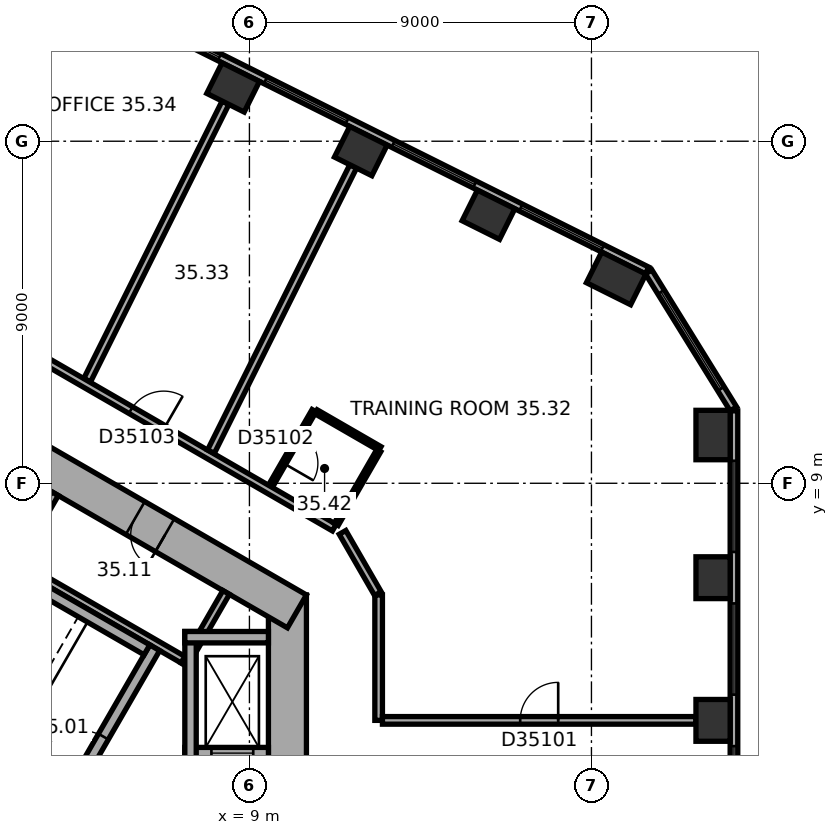
"""IFC4 building model, lengths in metres.
Left out: names, types, materials, properties, quantities, classifications, styles, units other than length and angle.
Written with IfcOpenShell. Run it as: python <this file> out.ifc"""

import sys

from ifc_helpers import new_model, si_unit, direction, frame, frame_2d, origin, origin_2d, place, context, subcontext, project, spatial, rectangle, extrude, element, fill, save


model = new_model("IFC4")
c1 = context("Model", 3, precision=1e-05, world=origin(), true_north=direction((0.0, 1.0)))
c2 = subcontext(c1, "Body", "Model", "MODEL_VIEW")
j1 = project(units=[si_unit("LENGTHUNIT", "METRE"), si_unit("PLANEANGLEUNIT", "RADIAN")], contexts=[c1])
p1 = place(None, origin())
s1 = spatial("IfcSite", under=j1, at=p1, CompositionType="ELEMENT")
p2 = place(p1, origin())
s2 = spatial("IfcBuilding", under=s1, at=p2, CompositionType="ELEMENT")
p3 = place(p2, frame((0.0, 0.0, 146.6)))
s3 = spatial("IfcBuildingStorey", under=s2, at=p3, CompositionType="ELEMENT", Elevation=146.6)
for number, where, z_axis, x_axis in (
    (1, (21.2, 2.761, 0.0), (0.0, 0.0, 1.0), (0.0, 1.0, 0.0)),
    (2, (21.2, 6.515, 0.0), (0.0, 0.0, 1.0), (0.0, 1.0, 0.0)),
):
    element("IfcColumn", number, at=place(p3, frame(where, z_axis=z_axis, x_axis=x_axis)), inside=s3, PredefinedType="COLUMN", context=c2, shape_type="SweptSolid", body=[
        extrude(rectangle(XDim=1.1, YDim=0.9, at=origin_2d()), origin(), (0.0, 0.0, 1.0), 3.7),
    ])
for number, where, z_axis, x_axis in (
    (3, (21.2, 10.27, 0.0), (0.0, 0.0, 1.0), (0.0, 1.0, 0.0)),
    (4, (18.65, 14.39, 0.0), (0.0, 0.0, 1.0), (-0.895, 0.446, 0.0)),
):
    element("IfcColumn", number, at=place(p3, frame(where, z_axis=z_axis, x_axis=x_axis)), inside=s3, PredefinedType="COLUMN", context=c2, shape_type="SweptSolid", body=[
        extrude(rectangle(XDim=1.3, YDim=0.9, at=origin_2d()), origin(), (0.0, 0.0, 1.0), 3.7),
    ])
for number, where, z_axis, x_axis in (
    (5, (15.29, 16.065, 0.0), (0.0, 0.0, 1.0), (-0.895, 0.446, 0.0)),
    (6, (11.931, 17.74, 0.0), (0.0, 0.0, 1.0), (-0.895, 0.446, 0.0)),
    (7, (8.571, 19.416, 0.0), (0.0, 0.0, 1.0), (-0.895, 0.446, 0.0)),
):
    element("IfcColumn", number, at=place(p3, frame(where, z_axis=z_axis, x_axis=x_axis)), inside=s3, PredefinedType="COLUMN", context=c2, shape_type="SweptSolid", body=[
        extrude(rectangle(XDim=1.1, YDim=0.9, at=origin_2d()), origin(), (0.0, 0.0, 1.0), 3.7),
    ])
p4 = place(p3, frame((10.0, -6.062, 0.0), z_axis=(0.0, 0.0, 1.0), x_axis=(0.0, 1.0, 0.0)))
e8 = element("IfcWall", 8, at=p4, inside=s3, PredefinedType="SHEAR", context=c2, shape_type="SweptSolid", body=[
    extrude(rectangle(XDim=12.125, YDim=1.0, at=frame_2d((6.062, 0.0))), origin(), (0.0, 0.0, 1.0), 3.7),
])
p5 = place(p4, frame((6.262, 0.0, 0.0)))
e9 = element("IfcOpeningElement", 9, at=p5, cuts=e8, PredefinedType="OPENING", context=c2, shape_type="SweptSolid", body=[
    extrude(rectangle(XDim=1.5, YDim=2.1, at=frame_2d((0.75, 1.05))), frame((0.0, 0.51, 0.0), z_axis=(0.0, -1.0, 0.0), x_axis=(1.0, 0.0, 0.0)), (0.0, 0.0, 1.0), 1.02),
])
p6 = place(p4, frame((3.112, 0.0, 0.0)))
e10 = element("IfcOpeningElement", 10, at=p6, cuts=e8, PredefinedType="OPENING", context=c2, shape_type="SweptSolid", body=[
    extrude(rectangle(XDim=0.9, YDim=2.1, at=frame_2d((0.45, 1.05))), frame((0.0, 0.51, 0.0), z_axis=(0.0, -1.0, 0.0), x_axis=(1.0, 0.0, 0.0)), (0.0, 0.0, 1.0), 1.02),
])
p7 = place(p3, frame((10.25, 5.629, 0.0), z_axis=(0.0, 0.0, 1.0), x_axis=(-0.866022616891, 0.50000482701, 0.0)))
e11 = element("IfcWall", 11, at=p7, inside=s3, PredefinedType="SHEAR", context=c2, shape_type="SweptSolid", body=[
    extrude(rectangle(XDim=12.125, YDim=1.0, at=frame_2d((6.062, 0.0))), origin(), (0.0, 0.0, 1.0), 3.7),
])
p8 = place(p7, frame((4.012, 0.0, 0.0)))
e12 = element("IfcOpeningElement", 12, at=p8, cuts=e11, PredefinedType="OPENING", context=c2, shape_type="SweptSolid", body=[
    extrude(rectangle(XDim=0.9, YDim=2.1, at=frame_2d((0.45, 1.05))), frame((0.0, 0.51, 0.0), z_axis=(0.0, -1.0, 0.0), x_axis=(1.0, 0.0, 0.0)), (0.0, 0.0, 1.0), 1.02),
])
p9 = place(p7, frame((7.912, 0.0, 0.0)))
e13 = element("IfcOpeningElement", 13, at=p9, cuts=e11, PredefinedType="OPENING", context=c2, shape_type="SweptSolid", body=[
    extrude(rectangle(XDim=0.9, YDim=2.1, at=frame_2d((0.45, 1.05))), frame((0.0, 0.51, 0.0), z_axis=(0.0, -1.0, 0.0), x_axis=(1.0, 0.0, 0.0)), (0.0, 0.0, 1.0), 1.02),
])
p10 = place(p3, frame((21.75, -9.138, 0.0), z_axis=(0.0, 0.0, 1.0), x_axis=(0.0, 1.0, 0.0)))
e14 = element("IfcWall", 14, at=p10, inside=s3, PredefinedType="STANDARD", context=c2, shape_type="SweptSolid", body=[
    extrude(rectangle(XDim=20.044, YDim=0.2, at=frame_2d((10.022, 0.0))), origin(), (0.0, 0.0, 1.0), 3.7),
])
p11 = place(p10, frame((1.314, 0.0, 0.9)))
e15 = element("IfcOpeningElement", 15, at=p11, cuts=e14, PredefinedType="OPENING", context=c2, shape_type="SweptSolid", body=[
    extrude(rectangle(XDim=2.4, YDim=2.0, at=frame_2d((1.2, 1.0))), frame((0.0, 0.11, 0.0), z_axis=(0.0, -1.0, 0.0), x_axis=(1.0, 0.0, 0.0)), (0.0, 0.0, 1.0), 0.22),
])
p12 = place(p10, frame((5.069, 0.0, 0.9)))
e16 = element("IfcOpeningElement", 16, at=p12, cuts=e14, PredefinedType="OPENING", context=c2, shape_type="SweptSolid", body=[
    extrude(rectangle(XDim=2.4, YDim=2.0, at=frame_2d((1.2, 1.0))), frame((0.0, 0.11, 0.0), z_axis=(0.0, -1.0, 0.0), x_axis=(1.0, 0.0, 0.0)), (0.0, 0.0, 1.0), 0.22),
])
p13 = place(p10, frame((8.823, 0.0, 0.9)))
e17 = element("IfcOpeningElement", 17, at=p13, cuts=e14, PredefinedType="OPENING", context=c2, shape_type="SweptSolid", body=[
    extrude(rectangle(XDim=2.4, YDim=2.0, at=frame_2d((1.2, 1.0))), frame((0.0, 0.11, 0.0), z_axis=(0.0, -1.0, 0.0), x_axis=(1.0, 0.0, 0.0)), (0.0, 0.0, 1.0), 0.22),
])
p14 = place(p10, frame((12.577, 0.0, 0.9)))
e18 = element("IfcOpeningElement", 18, at=p14, cuts=e14, PredefinedType="OPENING", context=c2, shape_type="SweptSolid", body=[
    extrude(rectangle(XDim=2.4, YDim=2.0, at=frame_2d((1.2, 1.0))), frame((0.0, 0.11, 0.0), z_axis=(0.0, -1.0, 0.0), x_axis=(1.0, 0.0, 0.0)), (0.0, 0.0, 1.0), 0.22),
])
p15 = place(p10, frame((16.331, 0.0, 0.9)))
e19 = element("IfcOpeningElement", 19, at=p15, cuts=e14, PredefinedType="OPENING", context=c2, shape_type="SweptSolid", body=[
    extrude(rectangle(XDim=2.4, YDim=2.0, at=frame_2d((1.2, 1.0))), frame((0.0, 0.11, 0.0), z_axis=(0.0, -1.0, 0.0), x_axis=(1.0, 0.0, 0.0)), (0.0, 0.0, 1.0), 0.22),
])
p16 = place(p3, frame((21.735, 10.958, 0.0), z_axis=(0.0, 0.0, 1.0), x_axis=(-0.526213807775, 0.850352296702, 0.0)))
e20 = element("IfcWall", 20, at=p16, inside=s3, PredefinedType="STANDARD", context=c2, shape_type="SweptSolid", body=[
    extrude(rectangle(XDim=4.238, YDim=0.2, at=frame_2d((2.119, 0.0))), origin(), (0.0, 0.0, 1.0), 3.7),
])
p17 = place(p16, frame((0.619, 0.0, 0.9)))
e21 = element("IfcOpeningElement", 21, at=p17, cuts=e20, PredefinedType="OPENING", context=c2, shape_type="SweptSolid", body=[
    extrude(rectangle(XDim=3.0, YDim=2.0, at=frame_2d((1.5, 1.0))), frame((0.0, 0.11, 0.0), z_axis=(0.0, -1.0, 0.0), x_axis=(1.0, 0.0, 0.0)), (0.0, 0.0, 1.0), 0.22),
])
p18 = place(p3, frame((19.464, 14.599, 0.0), z_axis=(0.0, 0.0, 1.0), x_axis=(-0.894935755043, 0.446195018289, 0.0)))
e22 = element("IfcWall", 22, at=p18, inside=s3, PredefinedType="STANDARD", context=c2, shape_type="SweptSolid", body=[
    extrude(rectangle(XDim=20.044, YDim=0.2, at=frame_2d((10.022, 0.0))), origin(), (0.0, 0.0, 1.0), 3.7),
])
p19 = place(p18, frame((1.313, 0.0, 0.9)))
e23 = element("IfcOpeningElement", 23, at=p19, cuts=e22, PredefinedType="OPENING", context=c2, shape_type="SweptSolid", body=[
    extrude(rectangle(XDim=2.4, YDim=2.0, at=frame_2d((1.2, 1.0))), frame((0.0, 0.11, 0.0), z_axis=(0.0, -1.0, 0.0), x_axis=(1.0, 0.0, 0.0)), (0.0, 0.0, 1.0), 0.22),
])
p20 = place(p18, frame((5.067, 0.0, 0.9)))
e24 = element("IfcOpeningElement", 24, at=p20, cuts=e22, PredefinedType="OPENING", context=c2, shape_type="SweptSolid", body=[
    extrude(rectangle(XDim=2.4, YDim=2.0, at=frame_2d((1.2, 1.0))), frame((0.0, 0.11, 0.0), z_axis=(0.0, -1.0, 0.0), x_axis=(1.0, 0.0, 0.0)), (0.0, 0.0, 1.0), 0.22),
])
p21 = place(p18, frame((8.821, 0.0, 0.9)))
e25 = element("IfcOpeningElement", 25, at=p21, cuts=e22, PredefinedType="OPENING", context=c2, shape_type="SweptSolid", body=[
    extrude(rectangle(XDim=2.4, YDim=2.0, at=frame_2d((1.2, 1.0))), frame((0.0, 0.11, 0.0), z_axis=(0.0, -1.0, 0.0), x_axis=(1.0, 0.0, 0.0)), (0.0, 0.0, 1.0), 0.22),
])
p22 = place(p18, frame((12.575, 0.0, 0.9)))
e26 = element("IfcOpeningElement", 26, at=p22, cuts=e22, PredefinedType="OPENING", context=c2, shape_type="SweptSolid", body=[
    extrude(rectangle(XDim=2.4, YDim=2.0, at=frame_2d((1.2, 1.0))), frame((0.0, 0.11, 0.0), z_axis=(0.0, -1.0, 0.0), x_axis=(1.0, 0.0, 0.0)), (0.0, 0.0, 1.0), 0.22),
])
p23 = place(p18, frame((16.329, 0.0, 0.9)))
e27 = element("IfcOpeningElement", 27, at=p23, cuts=e22, PredefinedType="OPENING", context=c2, shape_type="SweptSolid", body=[
    extrude(rectangle(XDim=2.4, YDim=2.0, at=frame_2d((1.2, 1.0))), frame((0.0, 0.11, 0.0), z_axis=(0.0, -1.0, 0.0), x_axis=(1.0, 0.0, 0.0)), (0.0, 0.0, 1.0), 0.22),
])
p24 = place(p3, frame((7.424, 4.259, 0.0), z_axis=(0.0, 0.0, 1.0), x_axis=(-0.866026010844, 0.49999894854, 0.0)))
e28 = element("IfcWall", 28, at=p24, inside=s3, PredefinedType="PARTITIONING", context=c2, shape_type="SweptSolid", body=[
    extrude(rectangle(XDim=8.0, YDim=0.2, at=frame_2d((4.0, 0.0))), origin(), (0.0, 0.0, 1.0), 3.42),
])
for number, where, z_axis, x_axis in (
    (29, (7.287, 4.222, 0.0), (0.0, 0.0, 1.0), (0.5, 0.866, 0.0)),
    (30, (2.784, 6.822, 0.0), (0.0, 0.0, 1.0), (0.5, 0.866, 0.0)),
):
    element("IfcWall", number, at=place(p3, frame(where, z_axis=z_axis, x_axis=x_axis)), inside=s3, PredefinedType="PARTITIONING", context=c2, shape_type="SweptSolid", body=[
        extrude(rectangle(XDim=2.2, YDim=0.2, at=frame_2d((1.1, 0.0))), origin(), (0.0, 0.0, 1.0), 3.42),
    ])
p25 = place(p3, frame((4.158, 0.602, 0.0), z_axis=(0.0, 0.0, 1.0), x_axis=(0.499977259774, 0.866038532462, 0.0)))
e31 = element("IfcWall", 31, at=p25, inside=s3, PredefinedType="SHEAR", context=c2, shape_type="SweptSolid", body=[
    extrude(rectangle(XDim=4.7, YDim=0.3, at=frame_2d((2.35, 0.0))), origin(), (0.0, 0.0, 1.0), 3.42),
])
p26 = place(p25, frame((0.8, 0.0, 0.0)))
e32 = element("IfcOpeningElement", 32, at=p26, cuts=e31, PredefinedType="OPENING", context=c2, shape_type="SweptSolid", body=[
    extrude(rectangle(XDim=1.2, YDim=2.1, at=frame_2d((0.6, 1.05))), frame((0.0, 0.16, 0.0), z_axis=(0.0, -1.0, 0.0), x_axis=(1.0, 0.0, 0.0)), (0.0, 0.0, 1.0), 0.32),
])
for number, where, z_axis, x_axis in (
    (33, (4.103, 0.807, 0.0), (0.0, 0.0, 1.0), (-0.866, 0.5, 0.0)),
    (34, (6.303, 4.617, 0.0), (0.0, 0.0, 1.0), (-0.866, 0.5, 0.0)),
):
    element("IfcWall", number, at=place(p3, frame(where, z_axis=z_axis, x_axis=x_axis)), inside=s3, PredefinedType="SHEAR", context=c2, shape_type="SweptSolid", body=[
        extrude(rectangle(XDim=7.06, YDim=0.3, at=frame_2d((3.53, 0.0))), origin(), (0.0, 0.0, 1.0), 3.42),
    ])
p27 = place(p3, frame((7.3, 1.9, 0.0), z_axis=(0.0, 0.0, 1.0), x_axis=(1.0, 0.0, 0.0)))
e35 = element("IfcWall", 35, at=p27, inside=s3, PredefinedType="SHEAR", context=c2, shape_type="SweptSolid", body=[
    extrude(rectangle(XDim=2.2, YDim=0.3, at=frame_2d((1.1, 0.0))), origin(), (0.0, 0.0, 1.0), 3.42),
])
p28 = place(p27, frame((0.7, 0.0, 0.0)))
e36 = element("IfcOpeningElement", 36, at=p28, cuts=e35, PredefinedType="OPENING", context=c2, shape_type="SweptSolid", body=[
    extrude(rectangle(XDim=1.1, YDim=2.1, at=frame_2d((0.55, 1.05))), frame((0.0, 0.16, 0.0), z_axis=(0.0, -1.0, 0.0), x_axis=(1.0, 0.0, 0.0)), (0.0, 0.0, 1.0), 0.32),
])
p29 = place(p3, frame((7.45, 1.75, 0.0), z_axis=(0.0, 0.0, 1.0), x_axis=(0.0, 1.0, 0.0)))
e37 = element("IfcWall", 37, at=p29, inside=s3, PredefinedType="SHEAR", context=c2, shape_type="SweptSolid", body=[
    extrude(rectangle(XDim=3.35, YDim=0.3, at=frame_2d((1.675, 0.0))), origin(), (0.0, 0.0, 1.0), 3.42),
])
p30 = place(p3, frame((7.3, 4.95, 0.0), z_axis=(0.0, 0.0, 1.0), x_axis=(1.0, 0.0, 0.0)))
e38 = element("IfcWall", 38, at=p30, inside=s3, PredefinedType="SHEAR", context=c2, shape_type="SweptSolid", body=[
    extrude(rectangle(XDim=2.2, YDim=0.3, at=frame_2d((1.1, 0.0))), origin(), (0.0, 0.0, 1.0), 3.42),
])
p31 = place(p3, frame((8.37, 19.013, 0.0), z_axis=(0.0, 0.0, 1.0), x_axis=(-0.446183598632, -0.894941448538, 0.0)))
e39 = element("IfcWall", 39, at=p31, inside=s3, PredefinedType="PARTITIONING", context=c2, shape_type="SweptSolid", body=[
    extrude(rectangle(XDim=8.156, YDim=0.2, at=frame_2d((4.078, 0.0))), origin(), (0.0, 0.0, 1.0), 3.42),
])
p32 = place(p3, frame((9.552, 8.919, 0.0), z_axis=(0.0, 0.0, 1.0), x_axis=(0.499952165731, 0.866053019151, 0.0)))
e40 = element("IfcWall", 40, at=p32, inside=s3, PredefinedType="PARTITIONING", context=c2, shape_type="SweptSolid", body=[
    extrude(rectangle(XDim=2.3, YDim=0.12, at=frame_2d((1.15, 0.0))), origin(), (0.0, 0.0, 1.0), 3.42),
])
p33 = place(p32, frame((0.7, 0.0, 0.0)))
e41 = element("IfcOpeningElement", 41, at=p33, cuts=e40, PredefinedType="OPENING", context=c2, shape_type="SweptSolid", body=[
    extrude(rectangle(XDim=0.9, YDim=2.1, at=frame_2d((0.45, 1.05))), frame((0.0, 0.07, 0.0), z_axis=(0.0, -1.0, 0.0), x_axis=(1.0, 0.0, 0.0)), (0.0, 0.0, 1.0), 0.14),
])
p34 = place(p3, frame((10.753, 10.881, 0.0), z_axis=(0.0, 0.0, 1.0), x_axis=(0.866043088465, -0.499969367985, 0.0)))
e42 = element("IfcWall", 42, at=p34, inside=s3, PredefinedType="PARTITIONING", context=c2, shape_type="SweptSolid", body=[
    extrude(rectangle(XDim=1.94, YDim=0.12, at=frame_2d((0.97, 0.0))), origin(), (0.0, 0.0, 1.0), 3.42),
])
p35 = place(p3, frame((11.233, 7.833, 0.0), z_axis=(0.0, 0.0, 1.0), x_axis=(-0.866021713988, 0.50000639086, 0.0)))
e43 = element("IfcWall", 43, at=p35, inside=s3, PredefinedType="PARTITIONING", context=c2, shape_type="SweptSolid", body=[
    extrude(rectangle(XDim=11.834, YDim=0.2, at=frame_2d((5.917, 0.0))), origin(), (0.0, 0.0, 1.0), 3.42),
])
p36 = place(p35, frame((5.185, 0.0, 0.0)))
e44 = element("IfcOpeningElement", 44, at=p36, cuts=e43, PredefinedType="OPENING", context=c2, shape_type="SweptSolid", body=[
    extrude(rectangle(XDim=1.0, YDim=2.1, at=frame_2d((0.5, 1.05))), frame((0.0, 0.11, 0.0), z_axis=(0.0, -1.0, 0.0), x_axis=(1.0, 0.0, 0.0)), (0.0, 0.0, 1.0), 0.22),
])
p37 = place(p3, frame((11.73, 17.338, 0.0), z_axis=(0.0, 0.0, 1.0), x_axis=(-0.446165200553, -0.894950620881, 0.0)))
e45 = element("IfcWall", 45, at=p37, inside=s3, PredefinedType="PARTITIONING", context=c2, shape_type="SweptSolid", body=[
    extrude(rectangle(XDim=8.386, YDim=0.2, at=frame_2d((4.193, 0.0))), origin(), (0.0, 0.0, 1.0), 2.87),
])
p38 = place(p3, frame((12.38, 6.097, 0.0), z_axis=(0.0, 0.0, 1.0), x_axis=(-0.499964847546, 0.866045698112, 0.0)))
e46 = element("IfcWall", 46, at=p38, inside=s3, PredefinedType="PARTITIONING", context=c2, shape_type="SweptSolid", body=[
    extrude(rectangle(XDim=1.86, YDim=0.2, at=frame_2d((0.93, 0.0))), origin(), (0.0, 0.0, 1.0), 3.42),
])
p39 = place(p3, frame((12.4, 2.761, 0.0), z_axis=(0.0, 0.0, 1.0), x_axis=(0.0, 1.0, 0.0)))
e47 = element("IfcWall", 47, at=p39, inside=s3, PredefinedType="PARTITIONING", context=c2, shape_type="SweptSolid", body=[
    extrude(rectangle(XDim=3.301, YDim=0.2, at=frame_2d((1.65, 0.0))), origin(), (0.0, 0.0, 1.0), 3.42),
])
p40 = place(p3, frame((12.404, 9.859, 0.0), z_axis=(0.0, 0.0, 1.0), x_axis=(-0.500030632641, -0.866007717299, 0.0)))
e48 = element("IfcWall", 48, at=p40, inside=s3, PredefinedType="PARTITIONING", context=c2, shape_type="SweptSolid", body=[
    extrude(rectangle(XDim=2.24, YDim=0.12, at=frame_2d((1.12, 0.0))), origin(), (0.0, 0.0, 1.0), 3.42),
])
p41 = place(p3, frame((20.75, 2.761, 0.0), z_axis=(0.0, 0.0, 1.0), x_axis=(-1.0, 0.0, 0.0)))
e49 = element("IfcWall", 49, at=p41, inside=s3, PredefinedType="PARTITIONING", context=c2, shape_type="SweptSolid", body=[
    extrude(rectangle(XDim=8.25, YDim=0.2, at=frame_2d((4.125, 0.0))), origin(), (0.0, 0.0, 1.0), 3.42),
])
p42 = place(p41, frame((3.625, 0.0, 0.0)))
e50 = element("IfcOpeningElement", 50, at=p42, cuts=e49, PredefinedType="OPENING", context=c2, shape_type="SweptSolid", body=[
    extrude(rectangle(XDim=1.0, YDim=2.1, at=frame_2d((0.5, 1.05))), frame((0.0, 0.11, 0.0), z_axis=(0.0, -1.0, 0.0), x_axis=(1.0, 0.0, 0.0)), (0.0, 0.0, 1.0), 0.22),
])
p43 = place(p13, origin())
e51 = element("IfcWindow", 51, at=p43, inside=s3, PartitioningType="SINGLE_PANEL", PredefinedType="WINDOW", context=c2, shape_type="SweptSolid", body=[
    extrude(rectangle(XDim=2.4, YDim=2.0, at=frame_2d((1.2, 1.0))), frame((0.0, 0.03, 0.0), z_axis=(0.0, -1.0, 0.0), x_axis=(1.0, 0.0, 0.0)), (0.0, 0.0, 1.0), 0.06),
])
fill(e17, e51)
p44 = place(p14, origin())
e52 = element("IfcWindow", 52, at=p44, inside=s3, PartitioningType="SINGLE_PANEL", PredefinedType="WINDOW", context=c2, shape_type="SweptSolid", body=[
    extrude(rectangle(XDim=2.4, YDim=2.0, at=frame_2d((1.2, 1.0))), frame((0.0, 0.03, 0.0), z_axis=(0.0, -1.0, 0.0), x_axis=(1.0, 0.0, 0.0)), (0.0, 0.0, 1.0), 0.06),
])
fill(e18, e52)
p45 = place(p15, origin())
e53 = element("IfcWindow", 53, at=p45, inside=s3, PartitioningType="SINGLE_PANEL", PredefinedType="WINDOW", context=c2, shape_type="SweptSolid", body=[
    extrude(rectangle(XDim=2.4, YDim=2.0, at=frame_2d((1.2, 1.0))), frame((0.0, 0.03, 0.0), z_axis=(0.0, -1.0, 0.0), x_axis=(1.0, 0.0, 0.0)), (0.0, 0.0, 1.0), 0.06),
])
fill(e19, e53)
p46 = place(p17, origin())
e54 = element("IfcWindow", 54, at=p46, inside=s3, PartitioningType="SINGLE_PANEL", PredefinedType="WINDOW", context=c2, shape_type="SweptSolid", body=[
    extrude(rectangle(XDim=3.0, YDim=2.0, at=frame_2d((1.5, 1.0))), frame((0.0, 0.03, 0.0), z_axis=(0.0, -1.0, 0.0), x_axis=(1.0, 0.0, 0.0)), (0.0, 0.0, 1.0), 0.06),
])
fill(e21, e54)
p47 = place(p19, origin())
e55 = element("IfcWindow", 55, at=p47, inside=s3, PartitioningType="SINGLE_PANEL", PredefinedType="WINDOW", context=c2, shape_type="SweptSolid", body=[
    extrude(rectangle(XDim=2.4, YDim=2.0, at=frame_2d((1.2, 1.0))), frame((0.0, 0.03, 0.0), z_axis=(0.0, -1.0, 0.0), x_axis=(1.0, 0.0, 0.0)), (0.0, 0.0, 1.0), 0.06),
])
fill(e23, e55)
p48 = place(p20, origin())
e56 = element("IfcWindow", 56, at=p48, inside=s3, PartitioningType="SINGLE_PANEL", PredefinedType="WINDOW", context=c2, shape_type="SweptSolid", body=[
    extrude(rectangle(XDim=2.4, YDim=2.0, at=frame_2d((1.2, 1.0))), frame((0.0, 0.03, 0.0), z_axis=(0.0, -1.0, 0.0), x_axis=(1.0, 0.0, 0.0)), (0.0, 0.0, 1.0), 0.06),
])
fill(e24, e56)
p49 = place(p21, origin())
e57 = element("IfcWindow", 57, at=p49, inside=s3, PartitioningType="SINGLE_PANEL", PredefinedType="WINDOW", context=c2, shape_type="SweptSolid", body=[
    extrude(rectangle(XDim=2.4, YDim=2.0, at=frame_2d((1.2, 1.0))), frame((0.0, 0.03, 0.0), z_axis=(0.0, -1.0, 0.0), x_axis=(1.0, 0.0, 0.0)), (0.0, 0.0, 1.0), 0.06),
])
fill(e25, e57)
p50 = place(p22, origin())
e58 = element("IfcWindow", 58, at=p50, inside=s3, PartitioningType="SINGLE_PANEL", PredefinedType="WINDOW", context=c2, shape_type="SweptSolid", body=[
    extrude(rectangle(XDim=2.4, YDim=2.0, at=frame_2d((1.2, 1.0))), frame((0.0, 0.03, 0.0), z_axis=(0.0, -1.0, 0.0), x_axis=(1.0, 0.0, 0.0)), (0.0, 0.0, 1.0), 0.06),
])
fill(e26, e58)
p51 = place(p26, origin())
e59 = element("IfcDoor", 59, at=p51, inside=s3, OperationType="SINGLE_SWING_RIGHT", PredefinedType="DOOR", context=c2, shape_type="SweptSolid", body=[
    extrude(rectangle(XDim=1.2, YDim=2.1, at=frame_2d((0.6, 1.05))), frame((0.0, 0.025, 0.0), z_axis=(0.0, -1.0, 0.0), x_axis=(1.0, 0.0, 0.0)), (0.0, 0.0, 1.0), 0.05),
])
fill(e32, e59)
p52 = place(p8, origin())
e60 = element("IfcDoor", 60, at=p52, inside=s3, OperationType="SINGLE_SWING_LEFT", PredefinedType="DOOR", context=c2, shape_type="SweptSolid", body=[
    extrude(rectangle(XDim=0.9, YDim=2.1, at=frame_2d((0.45, 1.05))), frame((0.0, 0.025, 0.0), z_axis=(0.0, -1.0, 0.0), x_axis=(1.0, 0.0, 0.0)), (0.0, 0.0, 1.0), 0.05),
])
fill(e12, e60)
p53 = place(p28, origin())
e61 = element("IfcDoor", 61, at=p53, inside=s3, OperationType="DOUBLE_DOOR_SLIDING", PredefinedType="DOOR", context=c2, shape_type="SweptSolid", body=[
    extrude(rectangle(XDim=1.1, YDim=2.1, at=frame_2d((0.55, 1.05))), frame((0.0, 0.025, 0.0), z_axis=(0.0, -1.0, 0.0), x_axis=(1.0, 0.0, 0.0)), (0.0, 0.0, 1.0), 0.05),
])
fill(e36, e61)
p54 = place(p42, origin())
e62 = element("IfcDoor", 62, at=p54, inside=s3, OperationType="SINGLE_SWING_LEFT", PredefinedType="DOOR", context=c2, shape_type="SweptSolid", body=[
    extrude(rectangle(XDim=1.0, YDim=2.1, at=frame_2d((0.5, 1.05))), frame((0.0, 0.025, 0.0), z_axis=(0.0, -1.0, 0.0), x_axis=(1.0, 0.0, 0.0)), (0.0, 0.0, 1.0), 0.05),
])
fill(e50, e62)
p55 = place(p33, origin())
e63 = element("IfcDoor", 63, at=p55, inside=s3, OperationType="SINGLE_SWING_LEFT", PredefinedType="DOOR", context=c2, shape_type="SweptSolid", body=[
    extrude(rectangle(XDim=0.9, YDim=2.1, at=frame_2d((0.45, 1.05))), frame((0.0, 0.025, 0.0), z_axis=(0.0, -1.0, 0.0), x_axis=(1.0, 0.0, 0.0)), (0.0, 0.0, 1.0), 0.05),
])
fill(e41, e63)
p56 = place(p36, origin())
e64 = element("IfcDoor", 64, at=p56, inside=s3, OperationType="SINGLE_SWING_LEFT", PredefinedType="DOOR", context=c2, shape_type="SweptSolid", body=[
    extrude(rectangle(XDim=1.0, YDim=2.1, at=frame_2d((0.5, 1.05))), frame((0.0, 0.025, 0.0), z_axis=(0.0, -1.0, 0.0), x_axis=(1.0, 0.0, 0.0)), (0.0, 0.0, 1.0), 0.05),
])
fill(e44, e64)
save(model, sys.argv[1])
